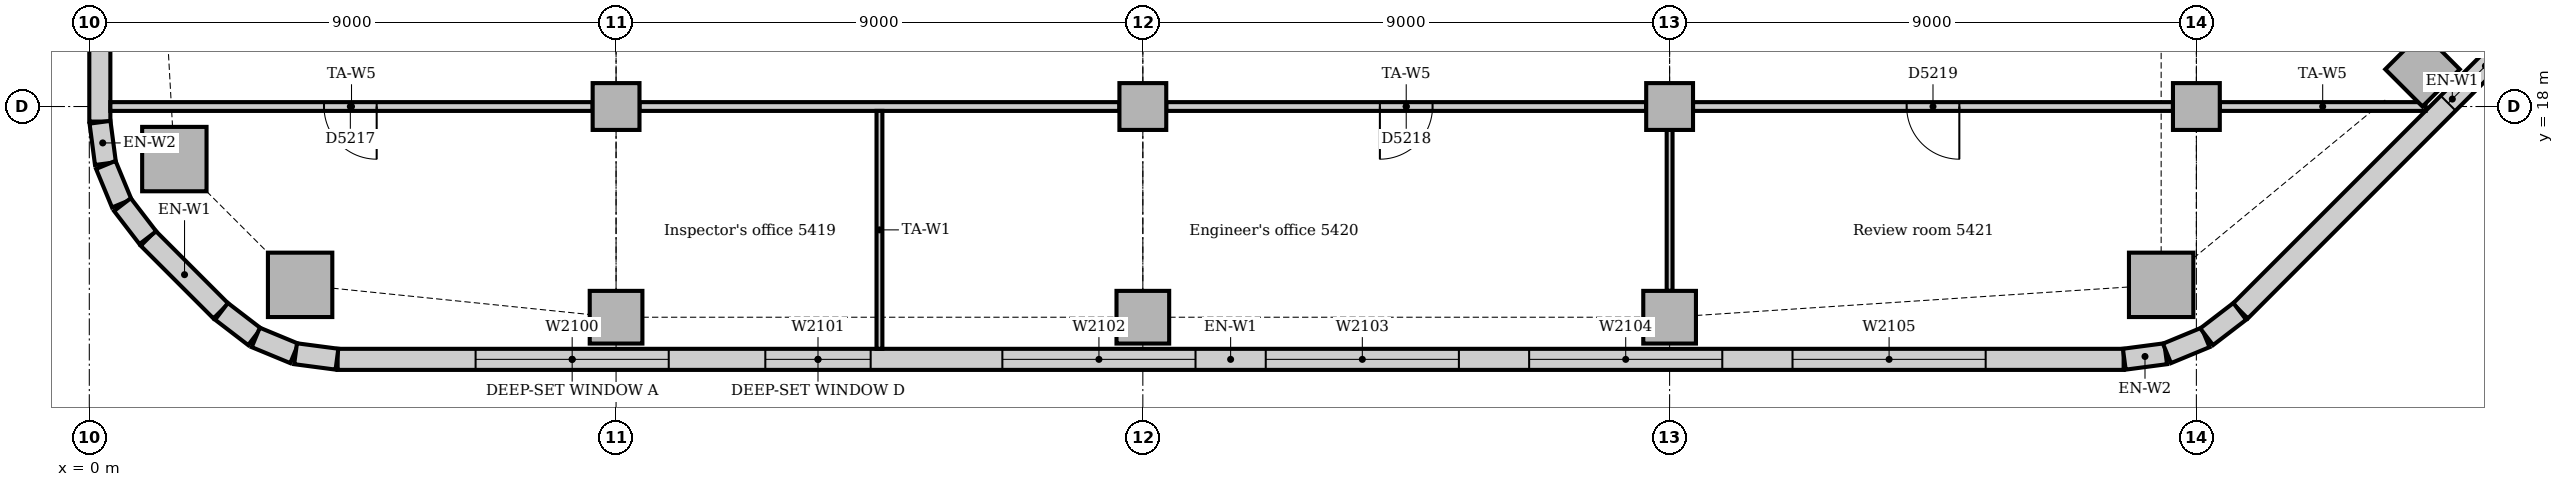
"""IFC4 building model, lengths in metres.
Left out: names, types, materials, properties, quantities, classifications, styles, units other than length and angle.
Written with IfcOpenShell. Run it as: python <this file> out.ifc"""

import sys

from ifc_helpers import new_model, si_unit, direction, frame, frame_2d, origin, origin_2d, place, context, subcontext, project, spatial, rectangle, extrude, element, fill, save


model = new_model("IFC4")
c1 = context("Model", 3, precision=1e-05, world=origin(), true_north=direction((0.0, 1.0)))
c2 = subcontext(c1, "Body", "Model", "MODEL_VIEW")
j1 = project(units=[si_unit("LENGTHUNIT", "METRE"), si_unit("PLANEANGLEUNIT", "RADIAN")], contexts=[c1])
p1 = place(None, origin())
s1 = spatial("IfcSite", under=j1, at=p1, CompositionType="ELEMENT")
p2 = place(p1, origin())
s2 = spatial("IfcBuilding", under=s1, at=p2, CompositionType="ELEMENT")
p3 = place(p2, frame((0.0, 0.0, 226.0)))
s3 = spatial("IfcBuildingStorey", under=s2, at=p3, CompositionType="ELEMENT", Elevation=226.0)
for number, where, z_axis, x_axis in (
    (1, (3.602, 14.953, 0.0), (0.0, 0.0, 1.0), (1.0, 0.0, 0.0)),
    (2, (35.398, 14.953, 0.0), (0.0, 0.0, 1.0), (1.0, 0.0, 0.0)),
    (3, (1.453, 17.102, 0.0), (0.0, 0.0, 1.0), (1.0, 0.0, 0.0)),
):
    element("IfcColumn", number, at=place(p3, frame(where, z_axis=z_axis, x_axis=x_axis)), inside=s3, PredefinedType="COLUMN", context=c2, shape_type="SweptSolid", body=[
        extrude(rectangle(XDim=1.1, YDim=1.1, at=origin_2d()), origin(), (0.0, 0.0, 1.0), 3.85),
    ])
for number, where, z_axis, x_axis in (
    (4, (9.0, 14.4, 0.0), (0.0, 0.0, 1.0), (1.0, 0.0, 0.0)),
    (5, (18.0, 14.4, 0.0), (0.0, 0.0, 1.0), (1.0, 0.0, 0.0)),
    (6, (27.0, 14.4, 0.0), (0.0, 0.0, 1.0), (1.0, 0.0, 0.0)),
    (7, (39.864, 18.636, 0.0), (0.0, 0.0, 1.0), (0.707, 0.707, 0.0)),
):
    element("IfcColumn", number, at=place(p3, frame(where, z_axis=z_axis, x_axis=x_axis)), inside=s3, PredefinedType="COLUMN", context=c2, shape_type="SweptSolid", body=[
        extrude(rectangle(XDim=0.9, YDim=0.9, at=origin_2d()), origin(), (0.0, 0.0, 1.0), 3.85),
    ])
for number, where, z_axis, x_axis in (
    (8, (9.0, 18.0, 0.0), (0.0, 0.0, 1.0), (1.0, 0.0, 0.0)),
    (9, (18.0, 18.0, 0.0), (0.0, 0.0, 1.0), (1.0, 0.0, 0.0)),
    (10, (27.0, 18.0, 0.0), (0.0, 0.0, 1.0), (1.0, 0.0, 0.0)),
    (11, (36.0, 18.0, 0.0), (0.0, 0.0, 1.0), (1.0, 0.0, 0.0)),
):
    element("IfcColumn", number, at=place(p3, frame(where, z_axis=z_axis, x_axis=x_axis)), inside=s3, PredefinedType="COLUMN", context=c2, shape_type="SweptSolid", body=[
        extrude(rectangle(XDim=0.8, YDim=0.8, at=origin_2d()), origin(), (0.0, 0.0, 1.0), 3.85),
    ])
p4 = place(p3, frame((4.243, 13.68, 0.0), z_axis=(0.0, 0.0, 1.0), x_axis=(1.0, 0.0, 0.0)))
e12 = element("IfcWall", 12, at=p4, inside=s3, PredefinedType="STANDARD", context=c2, shape_type="SweptSolid", body=[
    extrude(rectangle(XDim=30.515, YDim=0.36, at=frame_2d((15.257, 0.0))), origin(), (0.0, 0.0, 1.0), 3.85),
])
p5 = place(p4, frame((2.357, 0.0, 0.9)))
e13 = element("IfcOpeningElement", 13, at=p5, cuts=e12, PredefinedType="OPENING", context=c2, shape_type="SweptSolid", body=[
    extrude(rectangle(XDim=3.3, YDim=1.6, at=frame_2d((1.65, 0.8))), frame((0.0, 0.19, 0.0), z_axis=(0.0, -1.0, 0.0), x_axis=(1.0, 0.0, 0.0)), (0.0, 0.0, 1.0), 0.38),
])
p6 = place(p4, frame((7.307, 0.0, 0.9)))
e14 = element("IfcOpeningElement", 14, at=p6, cuts=e12, PredefinedType="OPENING", context=c2, shape_type="SweptSolid", body=[
    extrude(rectangle(XDim=1.8, YDim=1.6, at=frame_2d((0.9, 0.8))), frame((0.0, 0.19, 0.0), z_axis=(0.0, -1.0, 0.0), x_axis=(1.0, 0.0, 0.0)), (0.0, 0.0, 1.0), 0.38),
])
p7 = place(p4, frame((11.357, 0.0, 0.9)))
e15 = element("IfcOpeningElement", 15, at=p7, cuts=e12, PredefinedType="OPENING", context=c2, shape_type="SweptSolid", body=[
    extrude(rectangle(XDim=3.3, YDim=1.6, at=frame_2d((1.65, 0.8))), frame((0.0, 0.19, 0.0), z_axis=(0.0, -1.0, 0.0), x_axis=(1.0, 0.0, 0.0)), (0.0, 0.0, 1.0), 0.38),
])
p8 = place(p4, frame((15.857, 0.0, 0.9)))
e16 = element("IfcOpeningElement", 16, at=p8, cuts=e12, PredefinedType="OPENING", context=c2, shape_type="SweptSolid", body=[
    extrude(rectangle(XDim=3.3, YDim=1.6, at=frame_2d((1.65, 0.8))), frame((0.0, 0.19, 0.0), z_axis=(0.0, -1.0, 0.0), x_axis=(1.0, 0.0, 0.0)), (0.0, 0.0, 1.0), 0.38),
])
p9 = place(p4, frame((20.357, 0.0, 0.9)))
e17 = element("IfcOpeningElement", 17, at=p9, cuts=e12, PredefinedType="OPENING", context=c2, shape_type="SweptSolid", body=[
    extrude(rectangle(XDim=3.3, YDim=1.6, at=frame_2d((1.65, 0.8))), frame((0.0, 0.19, 0.0), z_axis=(0.0, -1.0, 0.0), x_axis=(1.0, 0.0, 0.0)), (0.0, 0.0, 1.0), 0.38),
])
p10 = place(p4, frame((24.857, 0.0, 0.9)))
e18 = element("IfcOpeningElement", 18, at=p10, cuts=e12, PredefinedType="OPENING", context=c2, shape_type="SweptSolid", body=[
    extrude(rectangle(XDim=3.3, YDim=1.6, at=frame_2d((1.65, 0.8))), frame((0.0, 0.19, 0.0), z_axis=(0.0, -1.0, 0.0), x_axis=(1.0, 0.0, 0.0)), (0.0, 0.0, 1.0), 0.38),
])
p11 = place(p3, frame((36.751, 14.506, 0.0), z_axis=(0.0, 0.0, 1.0), x_axis=(0.707106781187, 0.707106781187, 0.0)))
e19 = element("IfcWall", 19, at=p11, inside=s3, PredefinedType="STANDARD", context=c2, shape_type="SweptSolid", body=[
    extrude(rectangle(XDim=10.243, YDim=0.36, at=frame_2d((5.121, 0.0))), origin(), (0.0, 0.0, 1.0), 3.85),
])
p12 = place(p11, frame((5.021, 0.0, 0.9)))
e20 = element("IfcOpeningElement", 20, at=p12, cuts=e19, PredefinedType="OPENING", context=c2, shape_type="SweptSolid", body=[
    extrude(rectangle(XDim=1.8, YDim=1.6, at=frame_2d((0.9, 0.8))), frame((0.0, 0.19, 0.0), z_axis=(0.0, -1.0, 0.0), x_axis=(1.0, 0.0, 0.0)), (0.0, 0.0, 1.0), 0.38),
])
p13 = place(p3, frame((0.18, 21.0, 0.0), z_axis=(0.0, 0.0, 1.0), x_axis=(0.0, -1.0, 0.0)))
e21 = element("IfcWall", 21, at=p13, inside=s3, PredefinedType="STANDARD", context=c2, shape_type="SweptSolid", body=[
    extrude(rectangle(XDim=3.257, YDim=0.36, at=frame_2d((1.629, 0.0))), origin(), (0.0, 0.0, 1.0), 3.85),
])
p14 = place(p3, frame((1.006, 15.749, 0.0), z_axis=(0.0, 0.0, 1.0), x_axis=(0.707106781187, -0.707106781187, 0.0)))
e22 = element("IfcWall", 22, at=p14, inside=s3, PredefinedType="STANDARD", context=c2, shape_type="SweptSolid", body=[
    extrude(rectangle(XDim=1.757, YDim=0.36, at=frame_2d((0.879, 0.0))), origin(), (0.0, 0.0, 1.0), 3.85),
])
for number, where, z_axis, x_axis in (
    (23, (34.769, 13.683, 0.0), (0.0, 0.0, 1.0), (0.991, 0.131, 0.0)),
    (24, (35.497, 13.782, 0.0), (0.0, 0.0, 1.0), (0.924, 0.383, 0.0)),
):
    element("IfcWall", number, at=place(p3, frame(where, z_axis=z_axis, x_axis=x_axis)), inside=s3, PredefinedType="STANDARD", context=c2, shape_type="SweptSolid", body=[
        extrude(rectangle(XDim=0.713, YDim=0.36, at=frame_2d((0.356, 0.0))), origin(), (0.0, 0.0, 1.0), 3.85),
    ])
p15 = place(p3, frame((36.175, 14.066, 0.0), z_axis=(0.0, 0.0, 1.0), x_axis=(0.793321924995, 0.608802368033, 0.0)))
e25 = element("IfcWall", 25, at=p15, inside=s3, PredefinedType="STANDARD", context=c2, shape_type="SweptSolid", body=[
    extrude(rectangle(XDim=0.713, YDim=0.36, at=frame_2d((0.357, 0.0))), origin(), (0.0, 0.0, 1.0), 3.85),
])
for number, where, z_axis, x_axis in (
    (26, (0.183, 17.731, 0.0), (0.0, 0.0, 1.0), (0.131, -0.991, 0.0)),
    (27, (0.282, 17.003, 0.0), (0.0, 0.0, 1.0), (0.383, -0.924, 0.0)),
):
    element("IfcWall", number, at=place(p3, frame(where, z_axis=z_axis, x_axis=x_axis)), inside=s3, PredefinedType="STANDARD", context=c2, shape_type="SweptSolid", body=[
        extrude(rectangle(XDim=0.713, YDim=0.36, at=frame_2d((0.356, 0.0))), origin(), (0.0, 0.0, 1.0), 3.85),
    ])
for number, where, z_axis, x_axis in (
    (28, (0.566, 16.325, 0.0), (0.0, 0.0, 1.0), (0.609, -0.793, 0.0)),
    (29, (2.259, 14.5, 0.0), (0.0, 0.0, 1.0), (0.793, -0.609, 0.0)),
):
    element("IfcWall", number, at=place(p3, frame(where, z_axis=z_axis, x_axis=x_axis)), inside=s3, PredefinedType="STANDARD", context=c2, shape_type="SweptSolid", body=[
        extrude(rectangle(XDim=0.713, YDim=0.36, at=frame_2d((0.357, 0.0))), origin(), (0.0, 0.0, 1.0), 3.85),
    ])
for number, where, z_axis, x_axis in (
    (30, (2.844, 14.055, 0.0), (0.0, 0.0, 1.0), (0.924, -0.383, 0.0)),
    (31, (3.524, 13.776, 0.0), (0.0, 0.0, 1.0), (0.991, -0.131, 0.0)),
):
    element("IfcWall", number, at=place(p3, frame(where, z_axis=z_axis, x_axis=x_axis)), inside=s3, PredefinedType="STANDARD", context=c2, shape_type="SweptSolid", body=[
        extrude(rectangle(XDim=0.713, YDim=0.36, at=frame_2d((0.356, 0.0))), origin(), (0.0, 0.0, 1.0), 3.85),
    ])
p16 = place(p3, frame((36.4, 18.0, 0.0), z_axis=(0.0, 0.0, 1.0), x_axis=(1.0, 0.0, 0.0)))
e32 = element("IfcWall", 32, at=p16, inside=s3, PredefinedType="PARTITIONING", context=c2, shape_type="SweptSolid", body=[
    extrude(rectangle(XDim=3.516, YDim=0.15, at=frame_2d((1.758, 0.0))), origin(), (0.0, 0.0, 1.0), 3.602),
])
p17 = place(p3, frame((27.4, 18.0, 0.0), z_axis=(0.0, 0.0, 1.0), x_axis=(1.0, 0.0, 0.0)))
e33 = element("IfcWall", 33, at=p17, inside=s3, PredefinedType="PARTITIONING", context=c2, shape_type="SweptSolid", body=[
    extrude(rectangle(XDim=8.2, YDim=0.15, at=frame_2d((4.1, 0.0))), origin(), (0.0, 0.0, 1.0), 3.254),
])
p18 = place(p17, frame((3.65, 0.0, 0.0)))
e34 = element("IfcOpeningElement", 34, at=p18, cuts=e33, PredefinedType="OPENING", context=c2, shape_type="SweptSolid", body=[
    extrude(rectangle(XDim=0.9, YDim=2.1, at=frame_2d((0.45, 1.05))), frame((0.0, 0.085, 0.0), z_axis=(0.0, -1.0, 0.0), x_axis=(1.0, 0.0, 0.0)), (0.0, 0.0, 1.0), 0.17),
])
p19 = place(p3, frame((18.4, 18.0, 0.0), z_axis=(0.0, 0.0, 1.0), x_axis=(1.0, 0.0, 0.0)))
e35 = element("IfcWall", 35, at=p19, inside=s3, PredefinedType="PARTITIONING", context=c2, shape_type="SweptSolid", body=[
    extrude(rectangle(XDim=8.2, YDim=0.15, at=frame_2d((4.1, 0.0))), origin(), (0.0, 0.0, 1.0), 3.254),
])
p20 = place(p19, frame((3.65, 0.0, 0.0)))
e36 = element("IfcOpeningElement", 36, at=p20, cuts=e35, PredefinedType="OPENING", context=c2, shape_type="SweptSolid", body=[
    extrude(rectangle(XDim=0.9, YDim=2.1, at=frame_2d((0.45, 1.05))), frame((0.0, 0.085, 0.0), z_axis=(0.0, -1.0, 0.0), x_axis=(1.0, 0.0, 0.0)), (0.0, 0.0, 1.0), 0.17),
])
p21 = place(p3, frame((9.4, 18.0, 0.0), z_axis=(0.0, 0.0, 1.0), x_axis=(1.0, 0.0, 0.0)))
e37 = element("IfcWall", 37, at=p21, inside=s3, PredefinedType="PARTITIONING", context=c2, shape_type="SweptSolid", body=[
    extrude(rectangle(XDim=8.2, YDim=0.15, at=frame_2d((4.1, 0.0))), origin(), (0.0, 0.0, 1.0), 3.254),
])
p22 = place(p3, frame((0.36, 18.0, 0.0), z_axis=(0.0, 0.0, 1.0), x_axis=(1.0, 0.0, 0.0)))
e38 = element("IfcWall", 38, at=p22, inside=s3, PredefinedType="PARTITIONING", context=c2, shape_type="SweptSolid", body=[
    extrude(rectangle(XDim=8.24, YDim=0.15, at=frame_2d((4.12, 0.0))), origin(), (0.0, 0.0, 1.0), 3.254),
])
p23 = place(p22, frame((3.65, 0.0, 0.0)))
e39 = element("IfcOpeningElement", 39, at=p23, cuts=e38, PredefinedType="OPENING", context=c2, shape_type="SweptSolid", body=[
    extrude(rectangle(XDim=0.9, YDim=2.1, at=frame_2d((0.45, 1.05))), frame((0.0, 0.085, 0.0), z_axis=(0.0, -1.0, 0.0), x_axis=(1.0, 0.0, 0.0)), (0.0, 0.0, 1.0), 0.17),
])
p24 = place(p3, frame((13.5, 13.86, 0.0), z_axis=(0.0, 0.0, 1.0), x_axis=(0.0, 1.0, 0.0)))
e40 = element("IfcWall", 40, at=p24, inside=s3, PredefinedType="PARTITIONING", context=c2, shape_type="SweptSolid", body=[
    extrude(rectangle(XDim=4.065, YDim=0.1, at=frame_2d((2.033, 0.0))), origin(), (0.0, 0.0, 1.0), 3.85),
])
p25 = place(p3, frame((27.0, 14.85, 0.0), z_axis=(0.0, 0.0, 1.0), x_axis=(0.0, 1.0, 0.0)))
e41 = element("IfcWall", 41, at=p25, inside=s3, PredefinedType="PARTITIONING", context=c2, shape_type="SweptSolid", body=[
    extrude(rectangle(XDim=2.75, YDim=0.1, at=frame_2d((1.375, 0.0))), origin(), (0.0, 0.0, 1.0), 3.652),
])
p26 = place(p5, origin())
e42 = element("IfcWindow", 42, at=p26, inside=s3, PartitioningType="SINGLE_PANEL", PredefinedType="WINDOW", context=c2, shape_type="SweptSolid", body=[
    extrude(rectangle(XDim=3.3, YDim=1.6, at=frame_2d((1.65, 0.8))), frame((0.0, 0.13, 0.0), z_axis=(0.0, -1.0, 0.0), x_axis=(1.0, 0.0, 0.0)), (0.0, 0.0, 1.0), 0.06),
])
fill(e13, e42)
p27 = place(p6, origin())
e43 = element("IfcWindow", 43, at=p27, inside=s3, PartitioningType="SINGLE_PANEL", PredefinedType="WINDOW", context=c2, shape_type="SweptSolid", body=[
    extrude(rectangle(XDim=1.8, YDim=1.6, at=frame_2d((0.9, 0.8))), frame((0.0, 0.13, 0.0), z_axis=(0.0, -1.0, 0.0), x_axis=(1.0, 0.0, 0.0)), (0.0, 0.0, 1.0), 0.06),
])
fill(e14, e43)
p28 = place(p7, origin())
e44 = element("IfcWindow", 44, at=p28, inside=s3, PartitioningType="SINGLE_PANEL", PredefinedType="WINDOW", context=c2, shape_type="SweptSolid", body=[
    extrude(rectangle(XDim=3.3, YDim=1.6, at=frame_2d((1.65, 0.8))), frame((0.0, 0.13, 0.0), z_axis=(0.0, -1.0, 0.0), x_axis=(1.0, 0.0, 0.0)), (0.0, 0.0, 1.0), 0.06),
])
fill(e15, e44)
p29 = place(p8, origin())
e45 = element("IfcWindow", 45, at=p29, inside=s3, PartitioningType="SINGLE_PANEL", PredefinedType="WINDOW", context=c2, shape_type="SweptSolid", body=[
    extrude(rectangle(XDim=3.3, YDim=1.6, at=frame_2d((1.65, 0.8))), frame((0.0, 0.13, 0.0), z_axis=(0.0, -1.0, 0.0), x_axis=(1.0, 0.0, 0.0)), (0.0, 0.0, 1.0), 0.06),
])
fill(e16, e45)
p30 = place(p9, origin())
e46 = element("IfcWindow", 46, at=p30, inside=s3, PartitioningType="SINGLE_PANEL", PredefinedType="WINDOW", context=c2, shape_type="SweptSolid", body=[
    extrude(rectangle(XDim=3.3, YDim=1.6, at=frame_2d((1.65, 0.8))), frame((0.0, 0.13, 0.0), z_axis=(0.0, -1.0, 0.0), x_axis=(1.0, 0.0, 0.0)), (0.0, 0.0, 1.0), 0.06),
])
fill(e17, e46)
p31 = place(p10, origin())
e47 = element("IfcWindow", 47, at=p31, inside=s3, PartitioningType="SINGLE_PANEL", PredefinedType="WINDOW", context=c2, shape_type="SweptSolid", body=[
    extrude(rectangle(XDim=3.3, YDim=1.6, at=frame_2d((1.65, 0.8))), frame((0.0, 0.13, 0.0), z_axis=(0.0, -1.0, 0.0), x_axis=(1.0, 0.0, 0.0)), (0.0, 0.0, 1.0), 0.06),
])
fill(e18, e47)
p32 = place(p12, origin())
e48 = element("IfcWindow", 48, at=p32, inside=s3, PartitioningType="SINGLE_PANEL", PredefinedType="WINDOW", context=c2, shape_type="SweptSolid", body=[
    extrude(rectangle(XDim=1.8, YDim=1.6, at=frame_2d((0.9, 0.8))), frame((0.0, 0.13, 0.0), z_axis=(0.0, -1.0, 0.0), x_axis=(1.0, 0.0, 0.0)), (0.0, 0.0, 1.0), 0.06),
])
fill(e20, e48)
p33 = place(p23, frame((0.9, 0.0, 0.0), z_axis=(0.0, 0.0, 1.0), x_axis=(-1.0, 0.0, 0.0)))
e49 = element("IfcDoor", 49, at=p33, inside=s3, OperationType="SINGLE_SWING_LEFT", PredefinedType="DOOR", context=c2, shape_type="SweptSolid", body=[
    extrude(rectangle(XDim=0.9, YDim=2.1, at=frame_2d((0.45, 1.05))), frame((0.0, 0.025, 0.0), z_axis=(0.0, -1.0, 0.0), x_axis=(1.0, 0.0, 0.0)), (0.0, 0.0, 1.0), 0.05),
])
fill(e39, e49)
p34 = place(p20, frame((0.9, 0.0, 0.0), z_axis=(0.0, 0.0, 1.0), x_axis=(-1.0, 0.0, 0.0)))
e50 = element("IfcDoor", 50, at=p34, inside=s3, OperationType="SINGLE_SWING_RIGHT", PredefinedType="DOOR", context=c2, shape_type="SweptSolid", body=[
    extrude(rectangle(XDim=0.9, YDim=2.1, at=frame_2d((0.45, 1.05))), frame((0.0, 0.025, 0.0), z_axis=(0.0, -1.0, 0.0), x_axis=(1.0, 0.0, 0.0)), (0.0, 0.0, 1.0), 0.05),
])
fill(e36, e50)
p35 = place(p18, frame((0.9, 0.0, 0.0), z_axis=(0.0, 0.0, 1.0), x_axis=(-1.0, 0.0, 0.0)))
e51 = element("IfcDoor", 51, at=p35, inside=s3, OperationType="SINGLE_SWING_LEFT", PredefinedType="DOOR", context=c2, shape_type="SweptSolid", body=[
    extrude(rectangle(XDim=0.9, YDim=2.1, at=frame_2d((0.45, 1.05))), frame((0.0, 0.025, 0.0), z_axis=(0.0, -1.0, 0.0), x_axis=(1.0, 0.0, 0.0)), (0.0, 0.0, 1.0), 0.05),
])
fill(e34, e51)
save(model, sys.argv[1])
